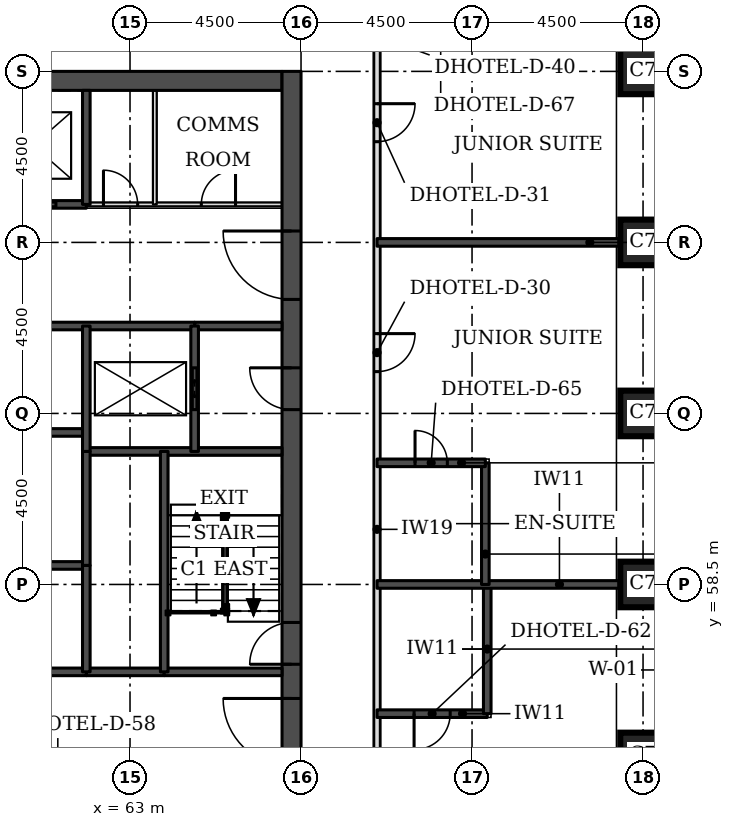
"""IFC4 building model, lengths in metres.
Left out: names, types, materials, properties, quantities, classifications, styles, units other than length and angle.
Written with IfcOpenShell. Run it as: python <this file> out.ifc"""

import sys

from ifc_helpers import new_model, si_unit, direction, frame, frame_2d, origin, origin_2d, place, context, subcontext, project, spatial, rectangle, extrude, element, fill, save


model = new_model("IFC4")
c1 = context("Model", 3, precision=1e-05, world=origin(), true_north=direction((0.0, 1.0)))
c2 = subcontext(c1, "Body", "Model", "MODEL_VIEW")
j1 = project(units=[si_unit("LENGTHUNIT", "METRE"), si_unit("PLANEANGLEUNIT", "RADIAN")], contexts=[c1])
p1 = place(None, origin())
s1 = spatial("IfcSite", under=j1, at=p1, CompositionType="ELEMENT")
p2 = place(p1, origin())
s2 = spatial("IfcBuilding", under=s1, at=p2, CompositionType="ELEMENT")
p3 = place(p2, frame((0.0, 0.0, 36.3)))
s3 = spatial("IfcBuildingStorey", under=s2, at=p3, CompositionType="ELEMENT", Elevation=36.3)
for number, where, z_axis, x_axis in (
    (1, (76.5, 54.0, 0.0), (0.0, 0.0, 1.0), (1.0, 0.0, 0.0)),
    (2, (76.5, 58.5, 0.0), (0.0, 0.0, 1.0), (1.0, 0.0, 0.0)),
    (3, (76.5, 63.0, 0.0), (0.0, 0.0, 1.0), (1.0, 0.0, 0.0)),
    (4, (76.5, 67.5, 0.0), (0.0, 0.0, 1.0), (1.0, 0.0, 0.0)),
    (5, (76.5, 72.0, 0.0), (0.0, 0.0, 1.0), (1.0, 0.0, 0.0)),
):
    element("IfcColumn", number, at=place(p3, frame(where, z_axis=z_axis, x_axis=x_axis)), inside=s3, PredefinedType="COLUMN", context=c2, shape_type="SweptSolid", body=[
        extrude(rectangle(XDim=1.2, YDim=1.2, at=origin_2d()), origin(), (0.0, 0.0, 1.0), 3.3),
    ])
p4 = place(p3, frame((45.5, 71.75, 0.0), z_axis=(0.0, 0.0, 1.0), x_axis=(1.0, 0.0, 0.0)))
e6 = element("IfcWall", 6, at=p4, inside=s3, PredefinedType="SHEAR", context=c2, shape_type="SweptSolid", body=[
    extrude(rectangle(XDim=21.5, YDim=0.5, at=frame_2d((10.75, 0.0))), origin(), (0.0, 0.0, 1.0), 3.3),
])
p5 = place(p3, frame((67.25, 49.5, 0.0), z_axis=(0.0, 0.0, 1.0), x_axis=(0.0, 1.0, 0.0)))
e7 = element("IfcWall", 7, at=p5, inside=s3, PredefinedType="SHEAR", context=c2, shape_type="SweptSolid", body=[
    extrude(rectangle(XDim=22.5, YDim=0.5, at=frame_2d((11.25, 0.0))), origin(), (0.0, 0.0, 1.0), 3.3),
])
p6 = place(p5, frame((4.2, 0.0, 0.0)))
e8 = element("IfcOpeningElement", 8, at=p6, cuts=e7, PredefinedType="OPENING", context=c2, shape_type="SweptSolid", body=[
    extrude(rectangle(XDim=1.8, YDim=2.1, at=frame_2d((0.9, 1.05))), frame((0.0, 0.26, 0.0), z_axis=(0.0, -1.0, 0.0), x_axis=(1.0, 0.0, 0.0)), (0.0, 0.0, 1.0), 0.52),
])
p7 = place(p5, frame((6.9, 0.0, 0.0)))
e9 = element("IfcOpeningElement", 9, at=p7, cuts=e7, PredefinedType="OPENING", context=c2, shape_type="SweptSolid", body=[
    extrude(rectangle(XDim=1.1, YDim=2.1, at=frame_2d((0.55, 1.05))), frame((0.0, 0.26, 0.0), z_axis=(0.0, -1.0, 0.0), x_axis=(1.0, 0.0, 0.0)), (0.0, 0.0, 1.0), 0.52),
])
p8 = place(p5, frame((13.6, 0.0, 0.0)))
e10 = element("IfcOpeningElement", 10, at=p8, cuts=e7, PredefinedType="OPENING", context=c2, shape_type="SweptSolid", body=[
    extrude(rectangle(XDim=1.1, YDim=2.1, at=frame_2d((0.55, 1.05))), frame((0.0, 0.26, 0.0), z_axis=(0.0, -1.0, 0.0), x_axis=(1.0, 0.0, 0.0)), (0.0, 0.0, 1.0), 0.52),
])
p9 = place(p5, frame((16.5, 0.0, 0.0)))
e11 = element("IfcOpeningElement", 11, at=p9, cuts=e7, PredefinedType="OPENING", context=c2, shape_type="SweptSolid", body=[
    extrude(rectangle(XDim=1.8, YDim=2.1, at=frame_2d((0.9, 1.05))), frame((0.0, 0.26, 0.0), z_axis=(0.0, -1.0, 0.0), x_axis=(1.0, 0.0, 0.0)), (0.0, 0.0, 1.0), 0.52),
])
p10 = place(p3, frame((69.5, 47.5, 0.0), z_axis=(0.0, 0.0, 1.0), x_axis=(0.0, 1.0, 0.0)))
e12 = element("IfcWall", 12, at=p10, inside=s3, PredefinedType="PARTITIONING", context=c2, shape_type="SweptSolid", body=[
    extrude(rectangle(XDim=26.5, YDim=0.15, at=frame_2d((13.25, 0.0))), origin(), (0.0, 0.0, 1.0), 3.08),
])
p11 = place(p10, frame((22.65, 0.0, 0.0)))
e13 = element("IfcOpeningElement", 13, at=p11, cuts=e12, PredefinedType="OPENING", context=c2, shape_type="SweptSolid", body=[
    extrude(rectangle(XDim=1.0, YDim=2.1, at=frame_2d((0.5, 1.05))), frame((0.0, 0.085, 0.0), z_axis=(0.0, -1.0, 0.0), x_axis=(1.0, 0.0, 0.0)), (0.0, 0.0, 1.0), 0.17),
])
p12 = place(p10, frame((16.6, 0.0, 0.0)))
e14 = element("IfcOpeningElement", 14, at=p12, cuts=e12, PredefinedType="OPENING", context=c2, shape_type="SweptSolid", body=[
    extrude(rectangle(XDim=1.0, YDim=2.1, at=frame_2d((0.5, 1.05))), frame((0.0, 0.085, 0.0), z_axis=(0.0, -1.0, 0.0), x_axis=(1.0, 0.0, 0.0)), (0.0, 0.0, 1.0), 0.17),
])
p13 = place(p10, frame((4.25, 0.0, 0.0)))
e15 = element("IfcOpeningElement", 15, at=p13, cuts=e12, PredefinedType="OPENING", context=c2, shape_type="SweptSolid", body=[
    extrude(rectangle(XDim=1.1, YDim=2.1, at=frame_2d((0.55, 1.05))), frame((0.0, 0.085, 0.0), z_axis=(0.0, -1.0, 0.0), x_axis=(1.0, 0.0, 0.0)), (0.0, 0.0, 1.0), 0.17),
])
p14 = place(p10, frame((0.55, 0.0, 0.0)))
e16 = element("IfcOpeningElement", 16, at=p14, cuts=e12, PredefinedType="OPENING", context=c2, shape_type="SweptSolid", body=[
    extrude(rectangle(XDim=1.0, YDim=2.1, at=frame_2d((0.5, 1.05))), frame((0.0, 0.085, 0.0), z_axis=(0.0, -1.0, 0.0), x_axis=(1.0, 0.0, 0.0)), (0.0, 0.0, 1.0), 0.17),
])
p15 = place(p3, frame((69.5, 55.1, 0.0), z_axis=(0.0, 0.0, 1.0), x_axis=(1.0, 0.0, 0.0)))
e17 = element("IfcWall", 17, at=p15, inside=s3, PredefinedType="SOLIDWALL", context=c2, shape_type="SweptSolid", body=[
    extrude(rectangle(XDim=2.9, YDim=0.2, at=frame_2d((1.45, 0.0))), origin(), (0.0, 0.0, 1.0), 3.08),
])
p16 = place(p15, frame((0.975, 0.0, 0.0)))
e18 = element("IfcOpeningElement", 18, at=p16, cuts=e17, PredefinedType="OPENING", context=c2, shape_type="SweptSolid", body=[
    extrude(rectangle(XDim=0.95, YDim=2.1, at=frame_2d((0.475, 1.05))), frame((0.0, 0.11, 0.0), z_axis=(0.0, -1.0, 0.0), x_axis=(1.0, 0.0, 0.0)), (0.0, 0.0, 1.0), 0.22),
])
p17 = place(p3, frame((72.4, 55.1, 0.0), z_axis=(0.0, 0.0, 1.0), x_axis=(0.0, 1.0, 0.0)))
e19 = element("IfcWall", 19, at=p17, inside=s3, PredefinedType="SOLIDWALL", context=c2, shape_type="SweptSolid", body=[
    extrude(rectangle(XDim=3.4, YDim=0.2, at=frame_2d((1.7, 0.0))), origin(), (0.0, 0.0, 1.0), 3.08),
])
p18 = place(p3, frame((69.5, 58.5, 0.0), z_axis=(0.0, 0.0, 1.0), x_axis=(1.0, 0.0, 0.0)))
e20 = element("IfcWall", 20, at=p18, inside=s3, PredefinedType="SOLIDWALL", context=c2, shape_type="SweptSolid", body=[
    extrude(rectangle(XDim=6.4, YDim=0.2, at=frame_2d((3.2, 0.0))), origin(), (0.0, 0.0, 1.0), 3.08),
])
p19 = place(p3, frame((72.35, 58.5, 0.0), z_axis=(0.0, 0.0, 1.0), x_axis=(0.0, 1.0, 0.0)))
e21 = element("IfcWall", 21, at=p19, inside=s3, PredefinedType="SOLIDWALL", context=c2, shape_type="SweptSolid", body=[
    extrude(rectangle(XDim=3.2, YDim=0.2, at=frame_2d((1.6, 0.0))), origin(), (0.0, 0.0, 1.0), 3.08),
])
p20 = place(p3, frame((69.5, 61.7, 0.0), z_axis=(0.0, 0.0, 1.0), x_axis=(1.0, 0.0, 0.0)))
e22 = element("IfcWall", 22, at=p20, inside=s3, PredefinedType="SOLIDWALL", context=c2, shape_type="SweptSolid", body=[
    extrude(rectangle(XDim=2.85, YDim=0.2, at=frame_2d((1.425, 0.0))), origin(), (0.0, 0.0, 1.0), 3.08),
])
p21 = place(p20, frame((1.0, 0.0, 0.0)))
e23 = element("IfcOpeningElement", 23, at=p21, cuts=e22, PredefinedType="OPENING", context=c2, shape_type="SweptSolid", body=[
    extrude(rectangle(XDim=0.85, YDim=2.1, at=frame_2d((0.425, 1.05))), frame((0.0, 0.11, 0.0), z_axis=(0.0, -1.0, 0.0), x_axis=(1.0, 0.0, 0.0)), (0.0, 0.0, 1.0), 0.22),
])
p22 = place(p3, frame((69.5, 67.5, 0.0), z_axis=(0.0, 0.0, 1.0), x_axis=(1.0, 0.0, 0.0)))
e24 = element("IfcWall", 24, at=p22, inside=s3, PredefinedType="SOLIDWALL", context=c2, shape_type="SweptSolid", body=[
    extrude(rectangle(XDim=6.4, YDim=0.2, at=frame_2d((3.2, 0.0))), origin(), (0.0, 0.0, 1.0), 3.08),
])
p23 = place(p3, frame((61.85, 56.2, 0.0), z_axis=(0.0, 0.0, 1.0), x_axis=(1.0, 0.0, 0.0)))
e25 = element("IfcWall", 25, at=p23, inside=s3, PredefinedType="SOLIDWALL", context=c2, shape_type="SweptSolid", body=[
    extrude(rectangle(XDim=2.05, YDim=0.2, at=frame_2d((1.025, 0.0))), origin(), (0.0, 0.0, 1.0), 3.08),
])
p24 = place(p3, frame((50.65, 56.2, 0.0), z_axis=(0.0, 0.0, 1.0), x_axis=(1.0, 0.0, 0.0)))
e26 = element("IfcWall", 26, at=p24, inside=s3, PredefinedType="SOLIDWALL", context=c2, shape_type="SweptSolid", body=[
    extrude(rectangle(XDim=11.2, YDim=0.2, at=frame_2d((5.6, 0.0))), origin(), (0.0, 0.0, 1.0), 3.08),
])
p25 = place(p3, frame((63.9, 56.2, 0.0), z_axis=(0.0, 0.0, 1.0), x_axis=(1.0, 0.0, 0.0)))
e27 = element("IfcWall", 27, at=p25, inside=s3, PredefinedType="SOLIDWALL", context=c2, shape_type="SweptSolid", body=[
    extrude(rectangle(XDim=3.1, YDim=0.2, at=frame_2d((1.55, 0.0))), origin(), (0.0, 0.0, 1.0), 3.08),
])
p26 = place(p3, frame((50.65, 59.0, 0.0), z_axis=(0.0, 0.0, 1.0), x_axis=(1.0, 0.0, 0.0)))
e28 = element("IfcWall", 28, at=p26, inside=s3, PredefinedType="SOLIDWALL", context=c2, shape_type="SweptSolid", body=[
    extrude(rectangle(XDim=11.2, YDim=0.2, at=frame_2d((5.6, 0.0))), origin(), (0.0, 0.0, 1.0), 3.3),
])
p27 = place(p3, frame((61.85, 62.0, 0.0), z_axis=(0.0, 0.0, 1.0), x_axis=(1.0, 0.0, 0.0)))
e29 = element("IfcWall", 29, at=p27, inside=s3, PredefinedType="SOLIDWALL", context=c2, shape_type="SweptSolid", body=[
    extrude(rectangle(XDim=5.15, YDim=0.2, at=frame_2d((2.575, 0.0))), origin(), (0.0, 0.0, 1.0), 3.08),
])
p28 = place(p3, frame((50.65, 62.5, 0.0), z_axis=(0.0, 0.0, 1.0), x_axis=(1.0, 0.0, 0.0)))
e30 = element("IfcWall", 30, at=p28, inside=s3, PredefinedType="SOLIDWALL", context=c2, shape_type="SweptSolid", body=[
    extrude(rectangle(XDim=11.2, YDim=0.2, at=frame_2d((5.6, 0.0))), origin(), (0.0, 0.0, 1.0), 3.3),
])
p29 = place(p3, frame((64.7, 65.3, 0.0), z_axis=(0.0, 0.0, 1.0), x_axis=(1.0, 0.0, 0.0)))
e31 = element("IfcWall", 31, at=p29, inside=s3, PredefinedType="SOLIDWALL", context=c2, shape_type="SweptSolid", body=[
    extrude(rectangle(XDim=2.3, YDim=0.2, at=frame_2d((1.15, 0.0))), origin(), (0.0, 0.0, 1.0), 3.08),
])
p30 = place(p3, frame((47.8, 65.3, 0.0), z_axis=(0.0, 0.0, 1.0), x_axis=(1.0, 0.0, 0.0)))
e32 = element("IfcWall", 32, at=p30, inside=s3, PredefinedType="SOLIDWALL", context=c2, shape_type="SweptSolid", body=[
    extrude(rectangle(XDim=16.9, YDim=0.2, at=frame_2d((8.45, 0.0))), origin(), (0.0, 0.0, 1.0), 3.08),
])
p31 = place(p3, frame((61.85, 68.5, 0.0), z_axis=(0.0, 0.0, 1.0), x_axis=(1.0, 0.0, 0.0)))
e33 = element("IfcWall", 33, at=p31, inside=s3, PredefinedType="PARTITIONING", context=c2, shape_type="SweptSolid", body=[
    extrude(rectangle(XDim=5.15, YDim=0.1, at=frame_2d((2.575, 0.0))), origin(), (0.0, 0.0, 1.0), 3.08),
])
p32 = place(p31, frame((3.026, 0.0, 0.0)))
e34 = element("IfcOpeningElement", 34, at=p32, cuts=e33, PredefinedType="OPENING", context=c2, shape_type="SweptSolid", body=[
    extrude(rectangle(XDim=0.9, YDim=2.1, at=frame_2d((0.45, 1.05))), frame((0.0, 0.06, 0.0), z_axis=(0.0, -1.0, 0.0), x_axis=(1.0, 0.0, 0.0)), (0.0, 0.0, 1.0), 0.12),
])
p33 = place(p31, frame((0.451, 0.0, 0.0)))
e35 = element("IfcOpeningElement", 35, at=p33, cuts=e33, PredefinedType="OPENING", context=c2, shape_type="SweptSolid", body=[
    extrude(rectangle(XDim=0.9, YDim=2.1, at=frame_2d((0.45, 1.05))), frame((0.0, 0.06, 0.0), z_axis=(0.0, -1.0, 0.0), x_axis=(1.0, 0.0, 0.0)), (0.0, 0.0, 1.0), 0.12),
])
p34 = place(p3, frame((50.65, 68.5, 0.0), z_axis=(0.0, 0.0, 1.0), x_axis=(1.0, 0.0, 0.0)))
e36 = element("IfcWall", 36, at=p34, inside=s3, PredefinedType="SOLIDWALL", context=c2, shape_type="SweptSolid", body=[
    extrude(rectangle(XDim=11.2, YDim=0.2, at=frame_2d((5.6, 0.0))), origin(), (0.0, 0.0, 1.0), 3.08),
])
p35 = place(p34, frame((0.8, 0.0, 0.0)))
e37 = element("IfcOpeningElement", 37, at=p35, cuts=e36, PredefinedType="OPENING", context=c2, shape_type="SweptSolid", body=[
    extrude(rectangle(XDim=1.2, YDim=2.1, at=frame_2d((0.6, 1.05))), frame((0.0, 0.11, 0.0), z_axis=(0.0, -1.0, 0.0), x_axis=(1.0, 0.0, 0.0)), (0.0, 0.0, 1.0), 0.22),
])
p36 = place(p34, frame((3.6, 0.0, 0.0)))
e38 = element("IfcOpeningElement", 38, at=p36, cuts=e36, PredefinedType="OPENING", context=c2, shape_type="SweptSolid", body=[
    extrude(rectangle(XDim=1.2, YDim=2.1, at=frame_2d((0.6, 1.05))), frame((0.0, 0.11, 0.0), z_axis=(0.0, -1.0, 0.0), x_axis=(1.0, 0.0, 0.0)), (0.0, 0.0, 1.0), 0.22),
])
p37 = place(p34, frame((6.4, 0.0, 0.0)))
e39 = element("IfcOpeningElement", 39, at=p37, cuts=e36, PredefinedType="OPENING", context=c2, shape_type="SweptSolid", body=[
    extrude(rectangle(XDim=1.2, YDim=2.1, at=frame_2d((0.6, 1.05))), frame((0.0, 0.11, 0.0), z_axis=(0.0, -1.0, 0.0), x_axis=(1.0, 0.0, 0.0)), (0.0, 0.0, 1.0), 0.22),
])
p38 = place(p34, frame((9.2, 0.0, 0.0)))
e40 = element("IfcOpeningElement", 40, at=p38, cuts=e36, PredefinedType="OPENING", context=c2, shape_type="SweptSolid", body=[
    extrude(rectangle(XDim=1.2, YDim=2.1, at=frame_2d((0.6, 1.05))), frame((0.0, 0.11, 0.0), z_axis=(0.0, -1.0, 0.0), x_axis=(1.0, 0.0, 0.0)), (0.0, 0.0, 1.0), 0.22),
])
p39 = place(p3, frame((61.85, 59.0, 0.0), z_axis=(0.0, 0.0, 1.0), x_axis=(0.0, 1.0, 0.0)))
e41 = element("IfcWall", 41, at=p39, inside=s3, PredefinedType="SOLIDWALL", context=c2, shape_type="SweptSolid", body=[
    extrude(rectangle(XDim=3.0, YDim=0.2, at=frame_2d((1.5, 0.0))), origin(), (0.0, 0.0, 1.0), 3.3),
])
p40 = place(p3, frame((61.85, 56.2, 0.0), z_axis=(0.0, 0.0, 1.0), x_axis=(0.0, 1.0, 0.0)))
e42 = element("IfcWall", 42, at=p40, inside=s3, PredefinedType="SOLIDWALL", context=c2, shape_type="SweptSolid", body=[
    extrude(rectangle(XDim=2.8, YDim=0.2, at=frame_2d((1.4, 0.0))), origin(), (0.0, 0.0, 1.0), 3.08),
])
p41 = place(p3, frame((61.85, 62.0, 0.0), z_axis=(0.0, 0.0, 1.0), x_axis=(0.0, 1.0, 0.0)))
e43 = element("IfcWall", 43, at=p41, inside=s3, PredefinedType="SOLIDWALL", context=c2, shape_type="SweptSolid", body=[
    extrude(rectangle(XDim=3.3, YDim=0.2, at=frame_2d((1.65, 0.0))), origin(), (0.0, 0.0, 1.0), 3.08),
])
p42 = place(p3, frame((61.85, 68.5, 0.0), z_axis=(0.0, 0.0, 1.0), x_axis=(0.0, 1.0, 0.0)))
e44 = element("IfcWall", 44, at=p42, inside=s3, PredefinedType="SOLIDWALL", context=c2, shape_type="SweptSolid", body=[
    extrude(rectangle(XDim=3.0, YDim=0.2, at=frame_2d((1.5, 0.0))), origin(), (0.0, 0.0, 1.0), 3.08),
])
p43 = place(p3, frame((63.653, 68.5, 0.0), z_axis=(0.0, 0.0, 1.0), x_axis=(0.0, 1.0, 0.0)))
e45 = element("IfcWall", 45, at=p43, inside=s3, PredefinedType="PARTITIONING", context=c2, shape_type="SweptSolid", body=[
    extrude(rectangle(XDim=3.0, YDim=0.1, at=frame_2d((1.5, 0.0))), origin(), (0.0, 0.0, 1.0), 3.08),
])
p44 = place(p3, frame((63.9, 56.2, 0.0), z_axis=(0.0, 0.0, 1.0), x_axis=(0.0, 1.0, 0.0)))
e46 = element("IfcWall", 46, at=p44, inside=s3, PredefinedType="SOLIDWALL", context=c2, shape_type="SweptSolid", body=[
    extrude(rectangle(XDim=5.8, YDim=0.2, at=frame_2d((2.9, 0.0))), origin(), (0.0, 0.0, 1.0), 3.08),
])
p45 = place(p3, frame((64.7, 62.0, 0.0), z_axis=(0.0, 0.0, 1.0), x_axis=(0.0, 1.0, 0.0)))
e47 = element("IfcWall", 47, at=p45, inside=s3, PredefinedType="SOLIDWALL", context=c2, shape_type="SweptSolid", body=[
    extrude(rectangle(XDim=3.3, YDim=0.2, at=frame_2d((1.65, 0.0))), origin(), (0.0, 0.0, 1.0), 3.08),
])
p46 = place(p45, frame((1.1, 0.0, 0.0)))
e48 = element("IfcOpeningElement", 48, at=p46, cuts=e47, PredefinedType="OPENING", context=c2, shape_type="SweptSolid", body=[
    extrude(rectangle(XDim=1.1, YDim=2.1, at=frame_2d((0.55, 1.05))), frame((0.0, 0.11, 0.0), z_axis=(0.0, -1.0, 0.0), x_axis=(1.0, 0.0, 0.0)), (0.0, 0.0, 1.0), 0.22),
])
p47 = place(p11, frame((1.0, 0.0, 0.0), z_axis=(0.0, 0.0, 1.0), x_axis=(-1.0, 0.0, 0.0)))
e49 = element("IfcDoor", 49, at=p47, inside=s3, OperationType="SINGLE_SWING_LEFT", PredefinedType="DOOR", context=c2, shape_type="SweptSolid", body=[
    extrude(rectangle(XDim=1.0, YDim=2.1, at=frame_2d((0.5, 1.05))), frame((0.0, 0.025, 0.0), z_axis=(0.0, -1.0, 0.0), x_axis=(1.0, 0.0, 0.0)), (0.0, 0.0, 1.0), 0.05),
])
fill(e13, e49)
p48 = place(p12, frame((1.0, 0.0, 0.0), z_axis=(0.0, 0.0, 1.0), x_axis=(-1.0, 0.0, 0.0)))
e50 = element("IfcDoor", 50, at=p48, inside=s3, OperationType="SINGLE_SWING_LEFT", PredefinedType="DOOR", context=c2, shape_type="SweptSolid", body=[
    extrude(rectangle(XDim=1.0, YDim=2.1, at=frame_2d((0.5, 1.05))), frame((0.0, 0.025, 0.0), z_axis=(0.0, -1.0, 0.0), x_axis=(1.0, 0.0, 0.0)), (0.0, 0.0, 1.0), 0.05),
])
fill(e14, e50)
p49 = place(p21, origin())
e51 = element("IfcDoor", 51, at=p49, inside=s3, OperationType="SINGLE_SWING_LEFT", PredefinedType="DOOR", context=c2, shape_type="SweptSolid", body=[
    extrude(rectangle(XDim=0.85, YDim=2.1, at=frame_2d((0.425, 1.05))), frame((0.0, 0.025, 0.0), z_axis=(0.0, -1.0, 0.0), x_axis=(1.0, 0.0, 0.0)), (0.0, 0.0, 1.0), 0.05),
])
fill(e23, e51)
p50 = place(p16, frame((0.95, 0.0, 0.0), z_axis=(0.0, 0.0, 1.0), x_axis=(-1.0, 0.0, 0.0)))
e52 = element("IfcDoor", 52, at=p50, inside=s3, OperationType="SINGLE_SWING_RIGHT", PredefinedType="DOOR", context=c2, shape_type="SweptSolid", body=[
    extrude(rectangle(XDim=0.95, YDim=2.1, at=frame_2d((0.475, 1.05))), frame((0.0, 0.025, 0.0), z_axis=(0.0, -1.0, 0.0), x_axis=(1.0, 0.0, 0.0)), (0.0, 0.0, 1.0), 0.05),
])
fill(e18, e52)
p51 = place(p38, origin())
e53 = element("IfcDoor", 53, at=p51, inside=s3, OperationType="DOUBLE_DOOR_SLIDING", PredefinedType="DOOR", context=c2, shape_type="SweptSolid", body=[
    extrude(rectangle(XDim=1.2, YDim=2.1, at=frame_2d((0.6, 1.05))), frame((0.0, 0.025, 0.0), z_axis=(0.0, -1.0, 0.0), x_axis=(1.0, 0.0, 0.0)), (0.0, 0.0, 1.0), 0.05),
])
fill(e40, e53)
p52 = place(p46, origin())
e54 = element("IfcDoor", 54, at=p52, inside=s3, OperationType="DOUBLE_DOOR_SLIDING", PredefinedType="DOOR", context=c2, shape_type="SweptSolid", body=[
    extrude(rectangle(XDim=1.1, YDim=2.1, at=frame_2d((0.55, 1.05))), frame((0.0, 0.025, 0.0), z_axis=(0.0, -1.0, 0.0), x_axis=(1.0, 0.0, 0.0)), (0.0, 0.0, 1.0), 0.05),
])
fill(e48, e54)
p53 = place(p6, origin())
e55 = element("IfcDoor", 55, at=p53, inside=s3, OperationType="SINGLE_SWING_RIGHT", PredefinedType="DOOR", context=c2, shape_type="SweptSolid", body=[
    extrude(rectangle(XDim=1.8, YDim=2.1, at=frame_2d((0.9, 1.05))), frame((0.0, 0.025, 0.0), z_axis=(0.0, -1.0, 0.0), x_axis=(1.0, 0.0, 0.0)), (0.0, 0.0, 1.0), 0.05),
])
fill(e8, e55)
p54 = place(p7, origin())
e56 = element("IfcDoor", 56, at=p54, inside=s3, OperationType="SINGLE_SWING_LEFT", PredefinedType="DOOR", context=c2, shape_type="SweptSolid", body=[
    extrude(rectangle(XDim=1.1, YDim=2.1, at=frame_2d((0.55, 1.05))), frame((0.0, 0.025, 0.0), z_axis=(0.0, -1.0, 0.0), x_axis=(1.0, 0.0, 0.0)), (0.0, 0.0, 1.0), 0.05),
])
fill(e9, e56)
p55 = place(p8, origin())
e57 = element("IfcDoor", 57, at=p55, inside=s3, OperationType="SINGLE_SWING_RIGHT", PredefinedType="DOOR", context=c2, shape_type="SweptSolid", body=[
    extrude(rectangle(XDim=1.1, YDim=2.1, at=frame_2d((0.55, 1.05))), frame((0.0, 0.025, 0.0), z_axis=(0.0, -1.0, 0.0), x_axis=(1.0, 0.0, 0.0)), (0.0, 0.0, 1.0), 0.05),
])
fill(e10, e57)
p56 = place(p9, origin())
e58 = element("IfcDoor", 58, at=p56, inside=s3, OperationType="SINGLE_SWING_RIGHT", PredefinedType="DOOR", context=c2, shape_type="SweptSolid", body=[
    extrude(rectangle(XDim=1.8, YDim=2.1, at=frame_2d((0.9, 1.05))), frame((0.0, 0.025, 0.0), z_axis=(0.0, -1.0, 0.0), x_axis=(1.0, 0.0, 0.0)), (0.0, 0.0, 1.0), 0.05),
])
fill(e11, e58)
p57 = place(p32, origin())
e59 = element("IfcDoor", 59, at=p57, inside=s3, OperationType="SINGLE_SWING_RIGHT", PredefinedType="DOOR", context=c2, shape_type="SweptSolid", body=[
    extrude(rectangle(XDim=0.9, YDim=2.1, at=frame_2d((0.45, 1.05))), frame((0.0, 0.025, 0.0), z_axis=(0.0, -1.0, 0.0), x_axis=(1.0, 0.0, 0.0)), (0.0, 0.0, 1.0), 0.05),
])
fill(e34, e59)
p58 = place(p33, origin())
e60 = element("IfcDoor", 60, at=p58, inside=s3, OperationType="SINGLE_SWING_LEFT", PredefinedType="DOOR", context=c2, shape_type="SweptSolid", body=[
    extrude(rectangle(XDim=0.9, YDim=2.1, at=frame_2d((0.45, 1.05))), frame((0.0, 0.025, 0.0), z_axis=(0.0, -1.0, 0.0), x_axis=(1.0, 0.0, 0.0)), (0.0, 0.0, 1.0), 0.05),
])
fill(e35, e60)
save(model, sys.argv[1])
